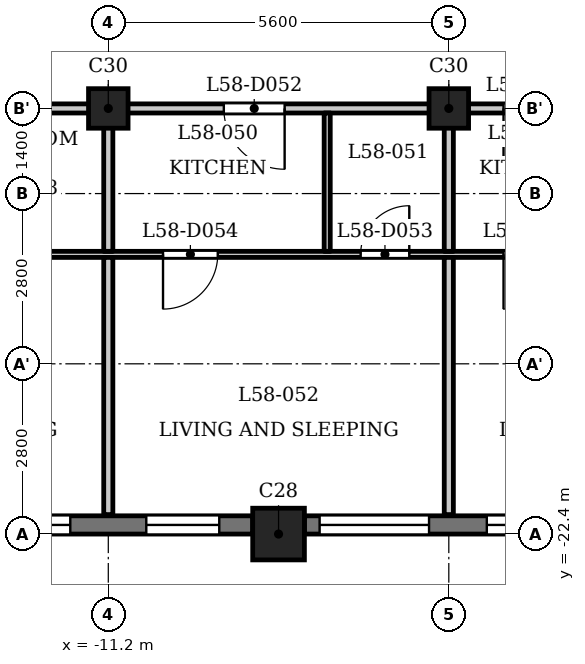
"""IFC4 building model, lengths in metres.
Left out: names, types, materials, properties, quantities, classifications, styles, units other than length and angle.
Written with IfcOpenShell. Run it as: python <this file> out.ifc"""

import sys

from ifc_helpers import new_model, si_unit, direction, frame, frame_2d, origin, origin_2d, place, context, subcontext, project, spatial, rectangle, extrude, element, fill, save


model = new_model("IFC4")
c1 = context("Model", 3, precision=1e-05, world=origin(), true_north=direction((0.0, 1.0)))
c2 = subcontext(c1, "Body", "Model", "MODEL_VIEW")
j1 = project(units=[si_unit("LENGTHUNIT", "METRE"), si_unit("PLANEANGLEUNIT", "RADIAN")], contexts=[c1])
p1 = place(None, origin())
s1 = spatial("IfcSite", under=j1, at=p1, CompositionType="ELEMENT")
p2 = place(p1, origin())
s2 = spatial("IfcBuilding", under=s1, at=p2, CompositionType="ELEMENT")
p3 = place(p2, frame((0.0, 0.0, 223.9)))
s3 = spatial("IfcBuildingStorey", under=s2, at=p3, CompositionType="ELEMENT", Elevation=223.9)
p4 = place(p3, frame((-8.4, -22.4, 0.0), z_axis=(0.0, 0.0, 1.0), x_axis=(1.0, 0.0, 0.0)))
e1 = element("IfcColumn", 1, at=p4, inside=s3, PredefinedType="COLUMN", context=c2, shape_type="SweptSolid", body=[
    extrude(rectangle(XDim=0.85, YDim=0.85, at=origin_2d()), origin(), (0.0, 0.0, 1.0), 3.5),
])
for number, where, z_axis, x_axis in (
    (2, (-11.2, -15.4, 0.0), (0.0, 0.0, 1.0), (1.0, 0.0, 0.0)),
    (3, (-5.6, -15.4, 0.0), (0.0, 0.0, 1.0), (1.0, 0.0, 0.0)),
):
    element("IfcColumn", number, at=place(p3, frame(where, z_axis=z_axis, x_axis=x_axis)), inside=s3, PredefinedType="COLUMN", context=c2, shape_type="SweptSolid", body=[
        extrude(rectangle(XDim=0.65, YDim=0.65, at=origin_2d()), origin(), (0.0, 0.0, 1.0), 3.5),
    ])
p5 = place(p3, frame((-13.575, -22.25, 0.0), z_axis=(0.0, 0.0, 1.0), x_axis=(1.0, 0.0, 0.0)))
e4 = element("IfcWall", 4, at=p5, inside=s3, PredefinedType="SOLIDWALL", context=c2, shape_type="SweptSolid", body=[
    extrude(rectangle(XDim=4.75, YDim=0.3, at=frame_2d((2.375, 0.0))), origin(), (0.0, 0.0, 1.0), 2.5),
])
p6 = place(p5, frame((0.55, 0.0, 0.6)))
e5 = element("IfcOpeningElement", 5, at=p6, cuts=e4, PredefinedType="OPENING", context=c2, shape_type="SweptSolid", body=[
    extrude(rectangle(XDim=1.2, YDim=1.55, at=frame_2d((0.6, 0.775))), frame((0.0, 0.16, 0.0), z_axis=(0.0, -1.0, 0.0), x_axis=(1.0, 0.0, 0.0)), (0.0, 0.0, 1.0), 0.32),
])
p7 = place(p5, frame((3.0, 0.0, 0.6)))
e6 = element("IfcOpeningElement", 6, at=p7, cuts=e4, PredefinedType="OPENING", context=c2, shape_type="SweptSolid", body=[
    extrude(rectangle(XDim=1.2, YDim=1.55, at=frame_2d((0.6, 0.775))), frame((0.0, 0.16, 0.0), z_axis=(0.0, -1.0, 0.0), x_axis=(1.0, 0.0, 0.0)), (0.0, 0.0, 1.0), 0.32),
])
p8 = place(p3, frame((-7.975, -22.25, 0.0), z_axis=(0.0, 0.0, 1.0), x_axis=(1.0, 0.0, 0.0)))
e7 = element("IfcWall", 7, at=p8, inside=s3, PredefinedType="SOLIDWALL", context=c2, shape_type="SweptSolid", body=[
    extrude(rectangle(XDim=4.75, YDim=0.3, at=frame_2d((2.375, 0.0))), origin(), (0.0, 0.0, 1.0), 2.5),
])
p9 = place(p8, frame((0.25, 0.0, 0.9)))
e8 = element("IfcOpeningElement", 8, at=p9, cuts=e7, PredefinedType="OPENING", context=c2, shape_type="SweptSolid", body=[
    extrude(rectangle(XDim=1.8, YDim=1.25, at=frame_2d((0.9, 0.625))), frame((0.0, 0.16, 0.0), z_axis=(0.0, -1.0, 0.0), x_axis=(1.0, 0.0, 0.0)), (0.0, 0.0, 1.0), 0.32),
])
p10 = place(p8, frame((3.0, 0.0, 0.6)))
e9 = element("IfcOpeningElement", 9, at=p10, cuts=e7, PredefinedType="OPENING", context=c2, shape_type="SweptSolid", body=[
    extrude(rectangle(XDim=1.2, YDim=1.55, at=frame_2d((0.6, 0.775))), frame((0.0, 0.16, 0.0), z_axis=(0.0, -1.0, 0.0), x_axis=(1.0, 0.0, 0.0)), (0.0, 0.0, 1.0), 0.32),
])
p11 = place(p3, frame((-23.594, -17.8, 0.0), z_axis=(0.0, 0.0, 1.0), x_axis=(1.0, 0.0, 0.0)))
e10 = element("IfcWall", 10, at=p11, inside=s3, PredefinedType="PARTITIONING", context=c2, shape_type="SweptSolid", body=[
    extrude(rectangle(XDim=47.188, YDim=0.1, at=frame_2d((23.594, 0.0))), origin(), (0.0, 0.0, 1.0), 3.2),
])
p12 = place(p11, frame((5.094, 0.0, 0.0)))
e11 = element("IfcOpeningElement", 11, at=p12, cuts=e10, PredefinedType="OPENING", context=c2, shape_type="SweptSolid", body=[
    extrude(rectangle(XDim=0.8, YDim=2.1, at=frame_2d((0.4, 1.05))), frame((0.0, 0.06, 0.0), z_axis=(0.0, -1.0, 0.0), x_axis=(1.0, 0.0, 0.0)), (0.0, 0.0, 1.0), 0.12),
])
p13 = place(p11, frame((1.126, 0.0, 0.0)))
e12 = element("IfcOpeningElement", 12, at=p13, cuts=e10, PredefinedType="OPENING", context=c2, shape_type="SweptSolid", body=[
    extrude(rectangle(XDim=0.9, YDim=2.1, at=frame_2d((0.45, 1.05))), frame((0.0, 0.06, 0.0), z_axis=(0.0, -1.0, 0.0), x_axis=(1.0, 0.0, 0.0)), (0.0, 0.0, 1.0), 0.12),
])
p14 = place(p11, frame((9.944, 0.0, 0.0)))
e13 = element("IfcOpeningElement", 13, at=p14, cuts=e10, PredefinedType="OPENING", context=c2, shape_type="SweptSolid", body=[
    extrude(rectangle(XDim=0.8, YDim=2.1, at=frame_2d((0.4, 1.05))), frame((0.0, 0.06, 0.0), z_axis=(0.0, -1.0, 0.0), x_axis=(1.0, 0.0, 0.0)), (0.0, 0.0, 1.0), 0.12),
])
p15 = place(p11, frame((7.444, 0.0, 0.0)))
e14 = element("IfcOpeningElement", 14, at=p15, cuts=e10, PredefinedType="OPENING", context=c2, shape_type="SweptSolid", body=[
    extrude(rectangle(XDim=0.9, YDim=2.1, at=frame_2d((0.45, 1.05))), frame((0.0, 0.06, 0.0), z_axis=(0.0, -1.0, 0.0), x_axis=(1.0, 0.0, 0.0)), (0.0, 0.0, 1.0), 0.12),
])
p16 = place(p11, frame((16.544, 0.0, 0.0)))
e15 = element("IfcOpeningElement", 15, at=p16, cuts=e10, PredefinedType="OPENING", context=c2, shape_type="SweptSolid", body=[
    extrude(rectangle(XDim=0.8, YDim=2.1, at=frame_2d((0.4, 1.05))), frame((0.0, 0.06, 0.0), z_axis=(0.0, -1.0, 0.0), x_axis=(1.0, 0.0, 0.0)), (0.0, 0.0, 1.0), 0.12),
])
p17 = place(p11, frame((13.294, 0.0, 0.0)))
e16 = element("IfcOpeningElement", 16, at=p17, cuts=e10, PredefinedType="OPENING", context=c2, shape_type="SweptSolid", body=[
    extrude(rectangle(XDim=0.9, YDim=2.1, at=frame_2d((0.45, 1.05))), frame((0.0, 0.06, 0.0), z_axis=(0.0, -1.0, 0.0), x_axis=(1.0, 0.0, 0.0)), (0.0, 0.0, 1.0), 0.12),
])
p18 = place(p11, frame((21.144, 0.0, 0.0)))
e17 = element("IfcOpeningElement", 17, at=p18, cuts=e10, PredefinedType="OPENING", context=c2, shape_type="SweptSolid", body=[
    extrude(rectangle(XDim=0.8, YDim=2.1, at=frame_2d((0.4, 1.05))), frame((0.0, 0.06, 0.0), z_axis=(0.0, -1.0, 0.0), x_axis=(1.0, 0.0, 0.0)), (0.0, 0.0, 1.0), 0.12),
])
p19 = place(p11, frame((18.894, 0.0, 0.0)))
e18 = element("IfcOpeningElement", 18, at=p19, cuts=e10, PredefinedType="OPENING", context=c2, shape_type="SweptSolid", body=[
    extrude(rectangle(XDim=0.9, YDim=2.1, at=frame_2d((0.45, 1.05))), frame((0.0, 0.06, 0.0), z_axis=(0.0, -1.0, 0.0), x_axis=(1.0, 0.0, 0.0)), (0.0, 0.0, 1.0), 0.12),
])
p20 = place(p11, frame((35.944, 0.0, 0.0)))
e19 = element("IfcOpeningElement", 19, at=p20, cuts=e10, PredefinedType="OPENING", context=c2, shape_type="SweptSolid", body=[
    extrude(rectangle(XDim=0.9, YDim=2.1, at=frame_2d((0.45, 1.05))), frame((0.0, 0.06, 0.0), z_axis=(0.0, -1.0, 0.0), x_axis=(1.0, 0.0, 0.0)), (0.0, 0.0, 1.0), 0.12),
])
p21 = place(p11, frame((32.594, 0.0, 0.0)))
e20 = element("IfcOpeningElement", 20, at=p21, cuts=e10, PredefinedType="OPENING", context=c2, shape_type="SweptSolid", body=[
    extrude(rectangle(XDim=0.9, YDim=2.1, at=frame_2d((0.45, 1.05))), frame((0.0, 0.06, 0.0), z_axis=(0.0, -1.0, 0.0), x_axis=(1.0, 0.0, 0.0)), (0.0, 0.0, 1.0), 0.12),
])
p22 = place(p11, frame((40.944, 0.0, 0.0)))
e21 = element("IfcOpeningElement", 21, at=p22, cuts=e10, PredefinedType="OPENING", context=c2, shape_type="SweptSolid", body=[
    extrude(rectangle(XDim=0.8, YDim=2.1, at=frame_2d((0.4, 1.05))), frame((0.0, 0.06, 0.0), z_axis=(0.0, -1.0, 0.0), x_axis=(1.0, 0.0, 0.0)), (0.0, 0.0, 1.0), 0.12),
])
p23 = place(p11, frame((45.444, 0.0, 0.0)))
e22 = element("IfcOpeningElement", 22, at=p23, cuts=e10, PredefinedType="OPENING", context=c2, shape_type="SweptSolid", body=[
    extrude(rectangle(XDim=0.9, YDim=2.1, at=frame_2d((0.45, 1.05))), frame((0.0, 0.06, 0.0), z_axis=(0.0, -1.0, 0.0), x_axis=(1.0, 0.0, 0.0)), (0.0, 0.0, 1.0), 0.12),
])
p24 = place(p3, frame((-24.684, -15.4, 0.0), z_axis=(0.0, 0.0, 1.0), x_axis=(1.0, 0.0, 0.0)))
e23 = element("IfcWall", 23, at=p24, inside=s3, PredefinedType="PARTITIONING", context=c2, shape_type="SweptSolid", body=[
    extrude(rectangle(XDim=49.368, YDim=0.15, at=frame_2d((24.684, 0.0))), origin(), (0.0, 0.0, 1.0), 3.2),
])
p25 = place(p24, frame((1.143, 0.0, 0.0)))
e24 = element("IfcOpeningElement", 24, at=p25, cuts=e23, PredefinedType="OPENING", context=c2, shape_type="SweptSolid", body=[
    extrude(rectangle(XDim=1.0, YDim=2.1, at=frame_2d((0.5, 1.05))), frame((0.0, 0.085, 0.0), z_axis=(0.0, -1.0, 0.0), x_axis=(1.0, 0.0, 0.0)), (0.0, 0.0, 1.0), 0.17),
])
p26 = place(p24, frame((8.534, 0.0, 0.0)))
e25 = element("IfcOpeningElement", 25, at=p26, cuts=e23, PredefinedType="OPENING", context=c2, shape_type="SweptSolid", body=[
    extrude(rectangle(XDim=1.0, YDim=2.1, at=frame_2d((0.5, 1.05))), frame((0.0, 0.085, 0.0), z_axis=(0.0, -1.0, 0.0), x_axis=(1.0, 0.0, 0.0)), (0.0, 0.0, 1.0), 0.17),
])
p27 = place(p24, frame((15.384, 0.0, 0.0)))
e26 = element("IfcOpeningElement", 26, at=p27, cuts=e23, PredefinedType="OPENING", context=c2, shape_type="SweptSolid", body=[
    extrude(rectangle(XDim=1.0, YDim=2.1, at=frame_2d((0.5, 1.05))), frame((0.0, 0.085, 0.0), z_axis=(0.0, -1.0, 0.0), x_axis=(1.0, 0.0, 0.0)), (0.0, 0.0, 1.0), 0.17),
])
p28 = place(p24, frame((19.984, 0.0, 0.0)))
e27 = element("IfcOpeningElement", 27, at=p28, cuts=e23, PredefinedType="OPENING", context=c2, shape_type="SweptSolid", body=[
    extrude(rectangle(XDim=1.0, YDim=2.1, at=frame_2d((0.5, 1.05))), frame((0.0, 0.085, 0.0), z_axis=(0.0, -1.0, 0.0), x_axis=(1.0, 0.0, 0.0)), (0.0, 0.0, 1.0), 0.17),
])
p29 = place(p24, frame((39.784, 0.0, 0.0)))
e28 = element("IfcOpeningElement", 28, at=p29, cuts=e23, PredefinedType="OPENING", context=c2, shape_type="SweptSolid", body=[
    extrude(rectangle(XDim=1.0, YDim=2.1, at=frame_2d((0.5, 1.05))), frame((0.0, 0.085, 0.0), z_axis=(0.0, -1.0, 0.0), x_axis=(1.0, 0.0, 0.0)), (0.0, 0.0, 1.0), 0.17),
])
p30 = place(p24, frame((47.384, 0.0, 0.0)))
e29 = element("IfcOpeningElement", 29, at=p30, cuts=e23, PredefinedType="OPENING", context=c2, shape_type="SweptSolid", body=[
    extrude(rectangle(XDim=1.0, YDim=2.1, at=frame_2d((0.5, 1.05))), frame((0.0, 0.085, 0.0), z_axis=(0.0, -1.0, 0.0), x_axis=(1.0, 0.0, 0.0)), (0.0, 0.0, 1.0), 0.17),
])
p31 = place(p3, frame((-11.2, -22.08, 0.0), z_axis=(0.0, 0.0, 1.0), x_axis=(0.0, 1.0, 0.0)))
e30 = element("IfcWall", 30, at=p31, inside=s3, PredefinedType="PARTITIONING", context=c2, shape_type="SweptSolid", body=[
    extrude(rectangle(XDim=4.23, YDim=0.15, at=frame_2d((2.115, 0.0))), origin(), (0.0, 0.0, 1.0), 3.2),
])
p32 = place(p3, frame((-11.2, -17.75, 0.0), z_axis=(0.0, 0.0, 1.0), x_axis=(0.0, 1.0, 0.0)))
e31 = element("IfcWall", 31, at=p32, inside=s3, PredefinedType="PARTITIONING", context=c2, shape_type="SweptSolid", body=[
    extrude(rectangle(XDim=2.275, YDim=0.15, at=frame_2d((1.137, 0.0))), origin(), (0.0, 0.0, 1.0), 3.2),
])
p33 = place(p3, frame((-7.6, -17.75, 0.0), z_axis=(0.0, 0.0, 1.0), x_axis=(0.0, 1.0, 0.0)))
e32 = element("IfcWall", 32, at=p33, inside=s3, PredefinedType="PARTITIONING", context=c2, shape_type="SweptSolid", body=[
    extrude(rectangle(XDim=2.275, YDim=0.1, at=frame_2d((1.137, 0.0))), origin(), (0.0, 0.0, 1.0), 3.2),
])
p34 = place(p3, frame((-5.6, -22.08, 0.0), z_axis=(0.0, 0.0, 1.0), x_axis=(0.0, 1.0, 0.0)))
e33 = element("IfcWall", 33, at=p34, inside=s3, PredefinedType="PARTITIONING", context=c2, shape_type="SweptSolid", body=[
    extrude(rectangle(XDim=4.23, YDim=0.15, at=frame_2d((2.115, 0.0))), origin(), (0.0, 0.0, 1.0), 3.2),
])
p35 = place(p3, frame((-5.6, -17.75, 0.0), z_axis=(0.0, 0.0, 1.0), x_axis=(0.0, 1.0, 0.0)))
e34 = element("IfcWall", 34, at=p35, inside=s3, PredefinedType="PARTITIONING", context=c2, shape_type="SweptSolid", body=[
    extrude(rectangle(XDim=2.275, YDim=0.15, at=frame_2d((1.137, 0.0))), origin(), (0.0, 0.0, 1.0), 3.2),
])
p36 = place(p27, origin())
e35 = element("IfcDoor", 35, at=p36, inside=s3, OperationType="SINGLE_SWING_RIGHT", PredefinedType="DOOR", context=c2, shape_type="SweptSolid", body=[
    extrude(rectangle(XDim=1.0, YDim=2.1, at=frame_2d((0.5, 1.05))), frame((0.0, 0.025, 0.0), z_axis=(0.0, -1.0, 0.0), x_axis=(1.0, 0.0, 0.0)), (0.0, 0.0, 1.0), 0.05),
])
fill(e26, e35)
p37 = place(p16, origin())
e36 = element("IfcDoor", 36, at=p37, inside=s3, OperationType="SINGLE_SWING_LEFT", PredefinedType="DOOR", context=c2, shape_type="SweptSolid", body=[
    extrude(rectangle(XDim=0.8, YDim=2.1, at=frame_2d((0.4, 1.05))), frame((0.0, 0.025, 0.0), z_axis=(0.0, -1.0, 0.0), x_axis=(1.0, 0.0, 0.0)), (0.0, 0.0, 1.0), 0.05),
])
fill(e15, e36)
p38 = place(p17, origin())
e37 = element("IfcDoor", 37, at=p38, inside=s3, OperationType="SINGLE_SWING_LEFT", PredefinedType="DOOR", context=c2, shape_type="SweptSolid", body=[
    extrude(rectangle(XDim=0.9, YDim=2.1, at=frame_2d((0.45, 1.05))), frame((0.0, 0.025, 0.0), z_axis=(0.0, -1.0, 0.0), x_axis=(1.0, 0.0, 0.0)), (0.0, 0.0, 1.0), 0.05),
])
fill(e16, e37)
p39 = place(p28, origin())
e38 = element("IfcDoor", 38, at=p39, inside=s3, OperationType="SINGLE_SWING_LEFT", PredefinedType="DOOR", context=c2, shape_type="SweptSolid", body=[
    extrude(rectangle(XDim=1.0, YDim=2.1, at=frame_2d((0.5, 1.05))), frame((0.0, 0.025, 0.0), z_axis=(0.0, -1.0, 0.0), x_axis=(1.0, 0.0, 0.0)), (0.0, 0.0, 1.0), 0.05),
])
fill(e27, e38)
p40 = place(p19, origin())
e39 = element("IfcDoor", 39, at=p40, inside=s3, OperationType="SINGLE_SWING_LEFT", PredefinedType="DOOR", context=c2, shape_type="SweptSolid", body=[
    extrude(rectangle(XDim=0.9, YDim=2.1, at=frame_2d((0.45, 1.05))), frame((0.0, 0.025, 0.0), z_axis=(0.0, -1.0, 0.0), x_axis=(1.0, 0.0, 0.0)), (0.0, 0.0, 1.0), 0.05),
])
fill(e18, e39)
p41 = place(p6, origin())
e40 = element("IfcWindow", 40, at=p41, inside=s3, PartitioningType="SINGLE_PANEL", PredefinedType="WINDOW", context=c2, shape_type="SweptSolid", body=[
    extrude(rectangle(XDim=1.2, YDim=1.55, at=frame_2d((0.6, 0.775))), frame((0.0, 0.03, 0.0), z_axis=(0.0, -1.0, 0.0), x_axis=(1.0, 0.0, 0.0)), (0.0, 0.0, 1.0), 0.06),
])
fill(e5, e40)
p42 = place(p7, origin())
e41 = element("IfcWindow", 41, at=p42, inside=s3, PartitioningType="SINGLE_PANEL", PredefinedType="WINDOW", context=c2, shape_type="SweptSolid", body=[
    extrude(rectangle(XDim=1.2, YDim=1.55, at=frame_2d((0.6, 0.775))), frame((0.0, 0.03, 0.0), z_axis=(0.0, -1.0, 0.0), x_axis=(1.0, 0.0, 0.0)), (0.0, 0.0, 1.0), 0.06),
])
fill(e6, e41)
p43 = place(p9, origin())
e42 = element("IfcWindow", 42, at=p43, inside=s3, PartitioningType="SINGLE_PANEL", PredefinedType="WINDOW", context=c2, shape_type="SweptSolid", body=[
    extrude(rectangle(XDim=1.8, YDim=1.25, at=frame_2d((0.9, 0.625))), frame((0.0, 0.03, 0.0), z_axis=(0.0, -1.0, 0.0), x_axis=(1.0, 0.0, 0.0)), (0.0, 0.0, 1.0), 0.06),
])
fill(e8, e42)
p44 = place(p10, origin())
e43 = element("IfcWindow", 43, at=p44, inside=s3, PartitioningType="SINGLE_PANEL", PredefinedType="WINDOW", context=c2, shape_type="SweptSolid", body=[
    extrude(rectangle(XDim=1.2, YDim=1.55, at=frame_2d((0.6, 0.775))), frame((0.0, 0.03, 0.0), z_axis=(0.0, -1.0, 0.0), x_axis=(1.0, 0.0, 0.0)), (0.0, 0.0, 1.0), 0.06),
])
fill(e9, e43)
save(model, sys.argv[1])
